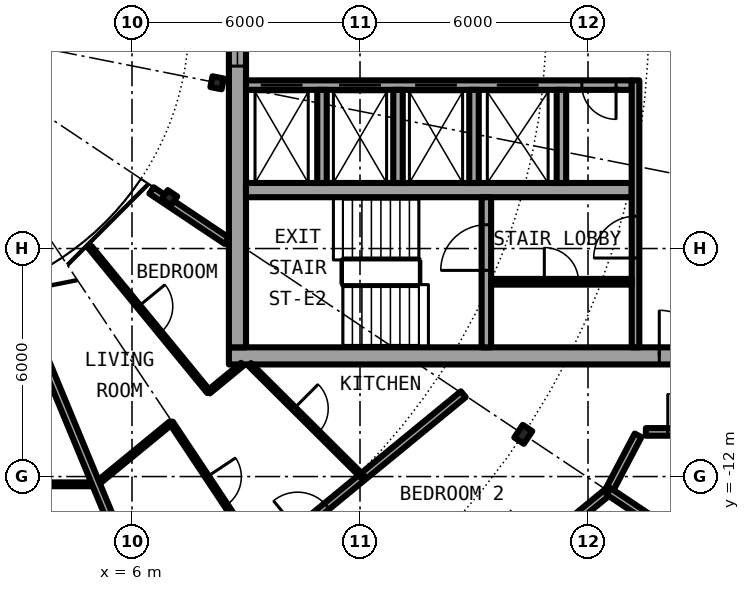
"""IFC4 building model, lengths in metres.
Left out: names, types, materials, properties, quantities, classifications, styles, units other than length and angle.
Written with IfcOpenShell. Run it as: python <this file> out.ifc"""

import sys

from ifc_helpers import new_model, si_unit, direction, frame, frame_2d, origin, origin_2d, place, context, subcontext, project, spatial, rectangle, i_section, extrude, element, fill, save


model = new_model("IFC4")
c1 = context("Model", 3, precision=1e-05, world=origin(), true_north=direction((0.0, 1.0)))
c2 = subcontext(c1, "Body", "Model", "MODEL_VIEW")
j1 = project(units=[si_unit("LENGTHUNIT", "METRE"), si_unit("PLANEANGLEUNIT", "RADIAN")], contexts=[c1])
p1 = place(None, origin())
s1 = spatial("IfcSite", under=j1, at=p1, CompositionType="ELEMENT")
p2 = place(p1, origin())
s2 = spatial("IfcBuilding", under=s1, at=p2, CompositionType="ELEMENT")
p3 = place(p2, frame((0.0, 0.0, 196.3)))
s3 = spatial("IfcBuildingStorey", under=s2, at=p3, CompositionType="ELEMENT", Elevation=196.3)
p4 = place(p3, frame((16.297, -10.889, 0.0), z_axis=(0.0, 0.0, 1.0), x_axis=(0.831469612303, -0.55557023302, 0.0)))
e1 = element("IfcColumn", 1, at=p4, inside=s3, PredefinedType="COLUMN", context=c2, shape_type="SweptSolid", body=[
    extrude(i_section(OverallWidth=0.3, OverallDepth=0.4, WebThickness=0.013, FlangeThickness=0.024, FilletRadius=0.027, at=origin_2d()), origin(), (0.0, 0.0, 1.0), 3.05),
])
for number, where, z_axis, x_axis in (
    (2, (6.984, -4.667, 0.0), (0.0, 0.0, 1.0), (0.831, -0.556, 0.0)),
    (3, (8.239, -1.639, 0.0), (0.0, 0.0, 1.0), (0.981, -0.195, 0.0)),
):
    element("IfcColumn", number, at=place(p3, frame(where, z_axis=z_axis, x_axis=x_axis)), inside=s3, PredefinedType="COLUMN", context=c2, shape_type="SweptSolid", body=[
        extrude(i_section(OverallWidth=0.3, OverallDepth=0.29, WebThickness=0.009, FlangeThickness=0.014, FilletRadius=0.027, at=origin_2d()), origin(), (0.0, 0.0, 1.0), 3.05),
    ])
p5 = place(p3, frame((8.55, -8.825, 0.0), z_axis=(0.0, 0.0, 1.0), x_axis=(1.0, 0.0, 0.0)))
e4 = element("IfcWall", 4, at=p5, inside=s3, PredefinedType="SHEAR", context=c2, shape_type="SweptSolid", body=[
    extrude(rectangle(XDim=13.5, YDim=0.45, at=frame_2d((6.75, 0.0))), origin(), (0.0, 0.0, 1.0), 3.05),
])
p6 = place(p5, frame((11.325, 0.0, 0.0)))
e5 = element("IfcOpeningElement", 5, at=p6, cuts=e4, PredefinedType="OPENING", context=c2, shape_type="SweptSolid", body=[
    extrude(rectangle(XDim=1.2, YDim=2.3, at=frame_2d((0.6, 1.15))), frame((0.0, 0.235, 0.0), z_axis=(0.0, -1.0, 0.0), x_axis=(1.0, 0.0, 0.0)), (0.0, 0.0, 1.0), 0.47),
])
p7 = place(p3, frame((8.775, -8.6, 0.0), z_axis=(0.0, 0.0, 1.0), x_axis=(0.0, 1.0, 0.0)))
e6 = element("IfcWall", 6, at=p7, inside=s3, PredefinedType="SHEAR", context=c2, shape_type="SweptSolid", body=[
    extrude(rectangle(XDim=17.2, YDim=0.45, at=frame_2d((8.6, 0.0))), origin(), (0.0, 0.0, 1.0), 3.05),
])
p8 = place(p7, frame((7.4, 0.0, 0.1)))
e7 = element("IfcOpeningElement", 7, at=p8, cuts=e6, PredefinedType="OPENING", context=c2, shape_type="SweptSolid", body=[
    extrude(rectangle(XDim=2.4, YDim=2.2, at=frame_2d((1.2, 1.1))), frame((0.0, 0.235, 0.0), z_axis=(0.0, -1.0, 0.0), x_axis=(1.0, 0.0, 0.0)), (0.0, 0.0, 1.0), 0.47),
])
p9 = place(p3, frame((19.15, -1.7, 0.0), z_axis=(0.0, 0.0, 1.0), x_axis=(-1.0, 0.0, 0.0)))
e8 = element("IfcWall", 8, at=p9, inside=s3, PredefinedType="SHEAR", context=c2, shape_type="SweptSolid", body=[
    extrude(rectangle(XDim=10.15, YDim=0.25, at=frame_2d((5.075, 0.0))), origin(), (0.0, 0.0, 1.0), 3.05),
])
p10 = place(p9, frame((8.663, 0.0, 0.0)))
e9 = element("IfcOpeningElement", 9, at=p10, cuts=e8, PredefinedType="OPENING", context=c2, shape_type="SweptSolid", body=[
    extrude(rectangle(XDim=1.1, YDim=2.3, at=frame_2d((0.55, 1.15))), frame((0.0, 0.135, 0.0), z_axis=(0.0, -1.0, 0.0), x_axis=(1.0, 0.0, 0.0)), (0.0, 0.0, 1.0), 0.27),
])
p11 = place(p9, frame((6.6, 0.0, 0.0)))
e10 = element("IfcOpeningElement", 10, at=p11, cuts=e8, PredefinedType="OPENING", context=c2, shape_type="SweptSolid", body=[
    extrude(rectangle(XDim=1.1, YDim=2.3, at=frame_2d((0.55, 1.15))), frame((0.0, 0.135, 0.0), z_axis=(0.0, -1.0, 0.0), x_axis=(1.0, 0.0, 0.0)), (0.0, 0.0, 1.0), 0.27),
])
p12 = place(p9, frame((4.6, 0.0, 0.0)))
e11 = element("IfcOpeningElement", 11, at=p12, cuts=e8, PredefinedType="OPENING", context=c2, shape_type="SweptSolid", body=[
    extrude(rectangle(XDim=1.1, YDim=2.3, at=frame_2d((0.55, 1.15))), frame((0.0, 0.135, 0.0), z_axis=(0.0, -1.0, 0.0), x_axis=(1.0, 0.0, 0.0)), (0.0, 0.0, 1.0), 0.27),
])
p13 = place(p9, frame((2.45, 0.0, 0.0)))
e12 = element("IfcOpeningElement", 12, at=p13, cuts=e8, PredefinedType="OPENING", context=c2, shape_type="SweptSolid", body=[
    extrude(rectangle(XDim=1.1, YDim=2.3, at=frame_2d((0.55, 1.15))), frame((0.0, 0.135, 0.0), z_axis=(0.0, -1.0, 0.0), x_axis=(1.0, 0.0, 0.0)), (0.0, 0.0, 1.0), 0.27),
])
p14 = place(p9, frame((0.413, 0.0, 0.0)))
e13 = element("IfcOpeningElement", 13, at=p14, cuts=e8, PredefinedType="OPENING", context=c2, shape_type="SweptSolid", body=[
    extrude(rectangle(XDim=0.9, YDim=2.3, at=frame_2d((0.45, 1.15))), frame((0.0, 0.135, 0.0), z_axis=(0.0, -1.0, 0.0), x_axis=(1.0, 0.0, 0.0)), (0.0, 0.0, 1.0), 0.27),
])
p15 = place(p3, frame((9.0, -4.462, 0.0), z_axis=(0.0, 0.0, 1.0), x_axis=(1.0, 0.0, 0.0)))
e14 = element("IfcWall", 14, at=p15, inside=s3, PredefinedType="SHEAR", context=c2, shape_type="SweptSolid", body=[
    extrude(rectangle(XDim=10.15, YDim=0.375, at=frame_2d((5.075, 0.0))), origin(), (0.0, 0.0, 1.0), 3.05),
])
p16 = place(p3, frame((15.325, -8.6, 0.0), z_axis=(0.0, 0.0, 1.0), x_axis=(0.0, 1.0, 0.0)))
e15 = element("IfcWall", 15, at=p16, inside=s3, PredefinedType="SHEAR", context=c2, shape_type="SweptSolid", body=[
    extrude(rectangle(XDim=3.95, YDim=0.25, at=frame_2d((1.975, 0.0))), origin(), (0.0, 0.0, 1.0), 3.05),
])
p17 = place(p16, frame((2.025, 0.0, 0.0)))
e16 = element("IfcOpeningElement", 16, at=p17, cuts=e15, PredefinedType="OPENING", context=c2, shape_type="SweptSolid", body=[
    extrude(rectangle(XDim=1.2, YDim=2.3, at=frame_2d((0.6, 1.15))), frame((0.0, 0.135, 0.0), z_axis=(0.0, -1.0, 0.0), x_axis=(1.0, 0.0, 0.0)), (0.0, 0.0, 1.0), 0.27),
])
for number, where, z_axis, x_axis in (
    (17, (15.0, -1.825, 0.0), (0.0, 0.0, 1.0), (0.0, -1.0, 0.0)),
    (18, (17.3, -1.825, 0.0), (0.0, 0.0, 1.0), (0.0, -1.0, 0.0)),
):
    element("IfcWall", number, at=place(p3, frame(where, z_axis=z_axis, x_axis=x_axis)), inside=s3, PredefinedType="SOLIDWALL", context=c2, shape_type="SweptSolid", body=[
        extrude(rectangle(XDim=2.45, YDim=0.25, at=frame_2d((1.225, 0.0))), origin(), (0.0, 0.0, 1.0), 2.7),
    ])
p18 = place(p3, frame((19.25, -8.6, 0.0), z_axis=(0.0, 0.0, 1.0), x_axis=(0.0, 1.0, 0.0)))
e19 = element("IfcWall", 19, at=p18, inside=s3, PredefinedType="SOLIDWALL", context=c2, shape_type="SweptSolid", body=[
    extrude(rectangle(XDim=7.025, YDim=0.2, at=frame_2d((3.513, 0.0))), origin(), (0.0, 0.0, 1.0), 2.7),
])
p19 = place(p18, frame((2.35, 0.0, 0.0)))
e20 = element("IfcOpeningElement", 20, at=p19, cuts=e19, PredefinedType="OPENING", context=c2, shape_type="SweptSolid", body=[
    extrude(rectangle(XDim=1.1, YDim=2.3, at=frame_2d((0.55, 1.15))), frame((0.0, 0.11, 0.0), z_axis=(0.0, -1.0, 0.0), x_axis=(1.0, 0.0, 0.0)), (0.0, 0.0, 1.0), 0.22),
])
for number, where, z_axis, x_axis in (
    (21, (11.0, -1.825, 0.0), (0.0, 0.0, 1.0), (0.0, -1.0, 0.0)),
    (22, (13.0, -1.825, 0.0), (0.0, 0.0, 1.0), (0.0, -1.0, 0.0)),
):
    element("IfcWall", number, at=place(p3, frame(where, z_axis=z_axis, x_axis=x_axis)), inside=s3, PredefinedType="SOLIDWALL", context=c2, shape_type="SweptSolid", body=[
        extrude(rectangle(XDim=2.45, YDim=0.25, at=frame_2d((1.225, 0.0))), origin(), (0.0, 0.0, 1.0), 2.7),
    ])
p20 = place(p3, frame((15.45, -6.875, 0.0), z_axis=(0.0, 0.0, 1.0), x_axis=(1.0, 0.0, 0.0)))
e23 = element("IfcWall", 23, at=p20, inside=s3, PredefinedType="PARTITIONING", context=c2, shape_type="SweptSolid", body=[
    extrude(rectangle(XDim=3.7, YDim=0.15, at=frame_2d((1.85, 0.0))), origin(), (0.0, 0.0, 1.0), 2.7),
])
p21 = place(p20, frame((1.4, 0.0, 0.0)))
e24 = element("IfcOpeningElement", 24, at=p21, cuts=e23, PredefinedType="OPENING", context=c2, shape_type="SweptSolid", body=[
    extrude(rectangle(XDim=0.9, YDim=2.3, at=frame_2d((0.45, 1.15))), frame((0.0, 0.085, 0.0), z_axis=(0.0, -1.0, 0.0), x_axis=(1.0, 0.0, 0.0)), (0.0, 0.0, 1.0), 0.17),
])
p22 = place(p3, frame((18.542, -12.389, 0.0), z_axis=(0.0, 0.0, 1.0), x_axis=(0.465359652486, 0.885121683068, 0.0)))
e25 = element("IfcWall", 25, at=p22, inside=s3, PredefinedType="PARTITIONING", context=c2, shape_type="SweptSolid", body=[
    extrude(rectangle(XDim=1.665, YDim=0.2, at=frame_2d((0.833, 0.0))), origin(), (0.0, 0.0, 1.0), 2.7),
])
p23 = place(p3, frame((8.534, -20.603, 0.0), z_axis=(0.0, 0.0, 1.0), x_axis=(0.772983503654, 0.634426121056, 0.0)))
e26 = element("IfcWall", 26, at=p23, inside=s3, PredefinedType="PARTITIONING", context=c2, shape_type="SweptSolid", body=[
    extrude(rectangle(XDim=12.947, YDim=0.2, at=frame_2d((6.474, 0.0))), origin(), (0.0, 0.0, 1.0), 2.7),
])
p24 = place(p23, frame((7.053, 0.0, 0.0)))
e27 = element("IfcOpeningElement", 27, at=p24, cuts=e26, PredefinedType="OPENING", context=c2, shape_type="SweptSolid", body=[
    extrude(rectangle(XDim=1.0, YDim=2.3, at=frame_2d((0.5, 1.15))), frame((0.0, 0.11, 0.0), z_axis=(0.0, -1.0, 0.0), x_axis=(1.0, 0.0, 0.0)), (0.0, 0.0, 1.0), 0.22),
])
p25 = place(p3, frame((6.773, -16.353, 0.0), z_axis=(0.0, 0.0, 1.0), x_axis=(0.773034536097, 0.634363938131, 0.0)))
e28 = element("IfcWall", 28, at=p25, inside=s3, PredefinedType="PARTITIONING", context=c2, shape_type="SweptSolid", body=[
    extrude(rectangle(XDim=10.277, YDim=0.2, at=frame_2d((5.138, 0.0))), origin(), (0.0, 0.0, 1.0), 2.7),
])
p26 = place(p25, frame((4.638, 0.0, 0.0)))
e29 = element("IfcOpeningElement", 29, at=p26, cuts=e28, PredefinedType="OPENING", context=c2, shape_type="SweptSolid", body=[
    extrude(rectangle(XDim=1.0, YDim=2.3, at=frame_2d((0.5, 1.15))), frame((0.0, 0.11, 0.0), z_axis=(0.0, -1.0, 0.0), x_axis=(1.0, 0.0, 0.0)), (0.0, 0.0, 1.0), 0.22),
])
p27 = place(p3, frame((5.055, -12.204, 0.0), z_axis=(0.0, 0.0, 1.0), x_axis=(0.772943675046, 0.634474645046, 0.0)))
e30 = element("IfcWall", 30, at=p27, inside=s3, PredefinedType="PARTITIONING", context=c2, shape_type="SweptSolid", body=[
    extrude(rectangle(XDim=2.557, YDim=0.1, at=frame_2d((1.278, 0.0))), origin(), (0.0, 0.0, 1.0), 2.7),
])
p28 = place(p3, frame((8.017, -9.773, 0.0), z_axis=(0.0, 0.0, 1.0), x_axis=(0.772786083133, 0.634666581534, 0.0)))
e31 = element("IfcWall", 31, at=p28, inside=s3, PredefinedType="PARTITIONING", context=c2, shape_type="SweptSolid", body=[
    extrude(rectangle(XDim=1.144, YDim=0.1, at=frame_2d((0.572, 0.0))), origin(), (0.0, 0.0, 1.0), 2.7),
])
p29 = place(p3, frame((2.527, -12.204, 0.0), z_axis=(0.0, 0.0, 1.0), x_axis=(1.0, 0.0, 0.0)))
e32 = element("IfcWall", 32, at=p29, inside=s3, PredefinedType="PARTITIONING", context=c2, shape_type="SweptSolid", body=[
    extrude(rectangle(XDim=2.528, YDim=0.1, at=frame_2d((1.264, 0.0))), origin(), (0.0, 0.0, 1.0), 2.7),
])
p30 = place(p3, frame((19.523, -10.825, 0.0), z_axis=(0.0, 0.0, 1.0), x_axis=(1.0, 0.0, 0.0)))
e33 = element("IfcWall", 33, at=p30, inside=s3, PredefinedType="PARTITIONING", context=c2, shape_type="SweptSolid", body=[
    extrude(rectangle(XDim=2.152, YDim=0.2, at=frame_2d((1.076, 0.0))), origin(), (0.0, 0.0, 1.0), 2.7),
])
p31 = place(p30, frame((0.576, 0.0, 0.0)))
e34 = element("IfcOpeningElement", 34, at=p31, cuts=e33, PredefinedType="OPENING", context=c2, shape_type="SweptSolid", body=[
    extrude(rectangle(XDim=1.0, YDim=2.3, at=frame_2d((0.5, 1.15))), frame((0.0, 0.11, 0.0), z_axis=(0.0, -1.0, 0.0), x_axis=(1.0, 0.0, 0.0)), (0.0, 0.0, 1.0), 0.22),
])
p32 = place(p3, frame((6.513, -4.472, 0.0), z_axis=(0.0, 0.0, 1.0), x_axis=(0.831403409976, -0.555669299026, 0.0)))
e35 = element("IfcWall", 35, at=p32, inside=s3, PredefinedType="PARTITIONING", context=c2, shape_type="SweptSolid", body=[
    extrude(rectangle(XDim=2.383, YDim=0.2, at=frame_2d((1.191, 0.0))), origin(), (0.0, 0.0, 1.0), 2.7),
])
p33 = place(p3, frame((2.954, -7.132, 0.0), z_axis=(0.0, 0.0, 1.0), x_axis=(0.382716169203, -0.92386597179, 0.0)))
e36 = element("IfcWall", 36, at=p33, inside=s3, PredefinedType="PARTITIONING", context=c2, shape_type="SweptSolid", body=[
    extrude(rectangle(XDim=9.981, YDim=0.2, at=frame_2d((4.99, 0.0))), origin(), (0.0, 0.0, 1.0), 2.7),
])
p34 = place(p3, frame((4.898, -5.968, 0.0), z_axis=(0.0, 0.0, 1.0), x_axis=(0.634401778971, -0.773003481776, 0.0)))
e37 = element("IfcWall", 37, at=p34, inside=s3, PredefinedType="PARTITIONING", context=c2, shape_type="SweptSolid", body=[
    extrude(rectangle(XDim=4.92, YDim=0.1, at=frame_2d((2.46, 0.0))), origin(), (0.0, 0.0, 1.0), 2.7),
])
p35 = place(p34, frame((2.01, 0.0, 0.0)))
e38 = element("IfcOpeningElement", 38, at=p35, cuts=e37, PredefinedType="OPENING", context=c2, shape_type="SweptSolid", body=[
    extrude(rectangle(XDim=0.9, YDim=2.3, at=frame_2d((0.45, 1.15))), frame((0.0, 0.06, 0.0), z_axis=(0.0, -1.0, 0.0), x_axis=(1.0, 0.0, 0.0)), (0.0, 0.0, 1.0), 0.12),
])
p36 = place(p3, frame((7.031, -10.582, 0.0), z_axis=(0.0, 0.0, 1.0), x_axis=(0.553303732327, -0.832979579457, 0.0)))
e39 = element("IfcWall", 39, at=p36, inside=s3, PredefinedType="PARTITIONING", context=c2, shape_type="SweptSolid", body=[
    extrude(rectangle(XDim=4.319, YDim=0.1, at=frame_2d((2.16, 0.0))), origin(), (0.0, 0.0, 1.0), 2.7),
])
p37 = place(p36, frame((1.71, 0.0, 0.0)))
e40 = element("IfcOpeningElement", 40, at=p37, cuts=e39, PredefinedType="OPENING", context=c2, shape_type="SweptSolid", body=[
    extrude(rectangle(XDim=0.9, YDim=2.3, at=frame_2d((0.45, 1.15))), frame((0.0, 0.06, 0.0), z_axis=(0.0, -1.0, 0.0), x_axis=(1.0, 0.0, 0.0)), (0.0, 0.0, 1.0), 0.12),
])
p38 = place(p3, frame((9.097, -9.05, 0.0), z_axis=(0.0, 0.0, 1.0), x_axis=(0.708909651863, -0.705299302067, 0.0)))
e41 = element("IfcWall", 41, at=p38, inside=s3, PredefinedType="PARTITIONING", context=c2, shape_type="SweptSolid", body=[
    extrude(rectangle(XDim=4.193, YDim=0.1, at=frame_2d((2.096, 0.0))), origin(), (0.0, 0.0, 1.0), 2.7),
])
p39 = place(p38, frame((1.646, 0.0, 0.0)))
e42 = element("IfcOpeningElement", 42, at=p39, cuts=e41, PredefinedType="OPENING", context=c2, shape_type="SweptSolid", body=[
    extrude(rectangle(XDim=0.9, YDim=2.3, at=frame_2d((0.45, 1.15))), frame((0.0, 0.06, 0.0), z_axis=(0.0, -1.0, 0.0), x_axis=(1.0, 0.0, 0.0)), (0.0, 0.0, 1.0), 0.12),
])
p40 = place(p3, frame((18.542, -12.389, 0.0), z_axis=(0.0, 0.0, 1.0), x_axis=(0.831387096605, -0.55569370664, 0.0)))
e43 = element("IfcWall", 43, at=p40, inside=s3, PredefinedType="PARTITIONING", context=c2, shape_type="SweptSolid", body=[
    extrude(rectangle(XDim=4.875, YDim=0.2, at=frame_2d((2.438, 0.0))), origin(), (0.0, 0.0, 1.0), 2.7),
])
p41 = place(p10, origin())
e44 = element("IfcDoor", 44, at=p41, inside=s3, OperationType="DOUBLE_DOOR_SLIDING", PredefinedType="DOOR", context=c2, shape_type="SweptSolid", body=[
    extrude(rectangle(XDim=1.1, YDim=2.3, at=frame_2d((0.55, 1.15))), frame((0.0, 0.025, 0.0), z_axis=(0.0, -1.0, 0.0), x_axis=(1.0, 0.0, 0.0)), (0.0, 0.0, 1.0), 0.05),
])
fill(e9, e44)
p42 = place(p11, origin())
e45 = element("IfcDoor", 45, at=p42, inside=s3, OperationType="DOUBLE_DOOR_SLIDING", PredefinedType="DOOR", context=c2, shape_type="SweptSolid", body=[
    extrude(rectangle(XDim=1.1, YDim=2.3, at=frame_2d((0.55, 1.15))), frame((0.0, 0.025, 0.0), z_axis=(0.0, -1.0, 0.0), x_axis=(1.0, 0.0, 0.0)), (0.0, 0.0, 1.0), 0.05),
])
fill(e10, e45)
p43 = place(p12, origin())
e46 = element("IfcDoor", 46, at=p43, inside=s3, OperationType="DOUBLE_DOOR_SLIDING", PredefinedType="DOOR", context=c2, shape_type="SweptSolid", body=[
    extrude(rectangle(XDim=1.1, YDim=2.3, at=frame_2d((0.55, 1.15))), frame((0.0, 0.025, 0.0), z_axis=(0.0, -1.0, 0.0), x_axis=(1.0, 0.0, 0.0)), (0.0, 0.0, 1.0), 0.05),
])
fill(e11, e46)
p44 = place(p13, origin())
e47 = element("IfcDoor", 47, at=p44, inside=s3, OperationType="DOUBLE_DOOR_SLIDING", PredefinedType="DOOR", context=c2, shape_type="SweptSolid", body=[
    extrude(rectangle(XDim=1.1, YDim=2.3, at=frame_2d((0.55, 1.15))), frame((0.0, 0.025, 0.0), z_axis=(0.0, -1.0, 0.0), x_axis=(1.0, 0.0, 0.0)), (0.0, 0.0, 1.0), 0.05),
])
fill(e12, e47)
p45 = place(p14, origin())
e48 = element("IfcDoor", 48, at=p45, inside=s3, OperationType="SINGLE_SWING_RIGHT", PredefinedType="DOOR", context=c2, shape_type="SweptSolid", body=[
    extrude(rectangle(XDim=0.9, YDim=2.3, at=frame_2d((0.45, 1.15))), frame((0.0, 0.025, 0.0), z_axis=(0.0, -1.0, 0.0), x_axis=(1.0, 0.0, 0.0)), (0.0, 0.0, 1.0), 0.05),
])
fill(e13, e48)
p46 = place(p21, origin())
e49 = element("IfcDoor", 49, at=p46, inside=s3, OperationType="SINGLE_SWING_LEFT", PredefinedType="DOOR", context=c2, shape_type="SweptSolid", body=[
    extrude(rectangle(XDim=0.9, YDim=2.3, at=frame_2d((0.45, 1.15))), frame((0.0, 0.025, 0.0), z_axis=(0.0, -1.0, 0.0), x_axis=(1.0, 0.0, 0.0)), (0.0, 0.0, 1.0), 0.05),
])
fill(e24, e49)
p47 = place(p17, origin())
e50 = element("IfcDoor", 50, at=p47, inside=s3, OperationType="SINGLE_SWING_LEFT", PredefinedType="DOOR", context=c2, shape_type="SweptSolid", body=[
    extrude(rectangle(XDim=1.2, YDim=2.3, at=frame_2d((0.6, 1.15))), frame((0.0, 0.025, 0.0), z_axis=(0.0, -1.0, 0.0), x_axis=(1.0, 0.0, 0.0)), (0.0, 0.0, 1.0), 0.05),
])
fill(e16, e50)
p48 = place(p19, origin())
e51 = element("IfcDoor", 51, at=p48, inside=s3, OperationType="SINGLE_SWING_RIGHT", PredefinedType="DOOR", context=c2, shape_type="SweptSolid", body=[
    extrude(rectangle(XDim=1.1, YDim=2.3, at=frame_2d((0.55, 1.15))), frame((0.0, 0.025, 0.0), z_axis=(0.0, -1.0, 0.0), x_axis=(1.0, 0.0, 0.0)), (0.0, 0.0, 1.0), 0.05),
])
fill(e20, e51)
p49 = place(p6, origin())
e52 = element("IfcDoor", 52, at=p49, inside=s3, OperationType="SINGLE_SWING_LEFT", PredefinedType="DOOR", context=c2, shape_type="SweptSolid", body=[
    extrude(rectangle(XDim=1.2, YDim=2.3, at=frame_2d((0.6, 1.15))), frame((0.0, 0.025, 0.0), z_axis=(0.0, -1.0, 0.0), x_axis=(1.0, 0.0, 0.0)), (0.0, 0.0, 1.0), 0.05),
])
fill(e5, e52)
p50 = place(p8, origin())
e53 = element("IfcWindow", 53, at=p50, inside=s3, PartitioningType="SINGLE_PANEL", PredefinedType="WINDOW", context=c2, shape_type="SweptSolid", body=[
    extrude(rectangle(XDim=2.4, YDim=2.2, at=frame_2d((1.2, 1.1))), frame((0.0, 0.03, 0.0), z_axis=(0.0, -1.0, 0.0), x_axis=(1.0, 0.0, 0.0)), (0.0, 0.0, 1.0), 0.06),
])
fill(e7, e53)
p51 = place(p26, origin())
e54 = element("IfcDoor", 54, at=p51, inside=s3, OperationType="SINGLE_SWING_RIGHT", PredefinedType="DOOR", context=c2, shape_type="SweptSolid", body=[
    extrude(rectangle(XDim=1.0, YDim=2.3, at=frame_2d((0.5, 1.15))), frame((0.0, 0.025, 0.0), z_axis=(0.0, -1.0, 0.0), x_axis=(1.0, 0.0, 0.0)), (0.0, 0.0, 1.0), 0.05),
])
fill(e29, e54)
p52 = place(p37, origin())
e55 = element("IfcDoor", 55, at=p52, inside=s3, OperationType="SINGLE_SWING_RIGHT", PredefinedType="DOOR", context=c2, shape_type="SweptSolid", body=[
    extrude(rectangle(XDim=0.9, YDim=2.3, at=frame_2d((0.45, 1.15))), frame((0.0, 0.025, 0.0), z_axis=(0.0, -1.0, 0.0), x_axis=(1.0, 0.0, 0.0)), (0.0, 0.0, 1.0), 0.05),
])
fill(e40, e55)
p53 = place(p39, origin())
e56 = element("IfcDoor", 56, at=p53, inside=s3, OperationType="SINGLE_SWING_RIGHT", PredefinedType="DOOR", context=c2, shape_type="SweptSolid", body=[
    extrude(rectangle(XDim=0.9, YDim=2.3, at=frame_2d((0.45, 1.15))), frame((0.0, 0.025, 0.0), z_axis=(0.0, -1.0, 0.0), x_axis=(1.0, 0.0, 0.0)), (0.0, 0.0, 1.0), 0.05),
])
fill(e42, e56)
p54 = place(p35, origin())
e57 = element("IfcDoor", 57, at=p54, inside=s3, OperationType="SINGLE_SWING_RIGHT", PredefinedType="DOOR", context=c2, shape_type="SweptSolid", body=[
    extrude(rectangle(XDim=0.9, YDim=2.3, at=frame_2d((0.45, 1.15))), frame((0.0, 0.025, 0.0), z_axis=(0.0, -1.0, 0.0), x_axis=(1.0, 0.0, 0.0)), (0.0, 0.0, 1.0), 0.05),
])
fill(e38, e57)
p55 = place(p31, origin())
e58 = element("IfcDoor", 58, at=p55, inside=s3, OperationType="SINGLE_SWING_LEFT", PredefinedType="DOOR", context=c2, shape_type="SweptSolid", body=[
    extrude(rectangle(XDim=1.0, YDim=2.3, at=frame_2d((0.5, 1.15))), frame((0.0, 0.025, 0.0), z_axis=(0.0, -1.0, 0.0), x_axis=(1.0, 0.0, 0.0)), (0.0, 0.0, 1.0), 0.05),
])
fill(e34, e58)
save(model, sys.argv[1])
